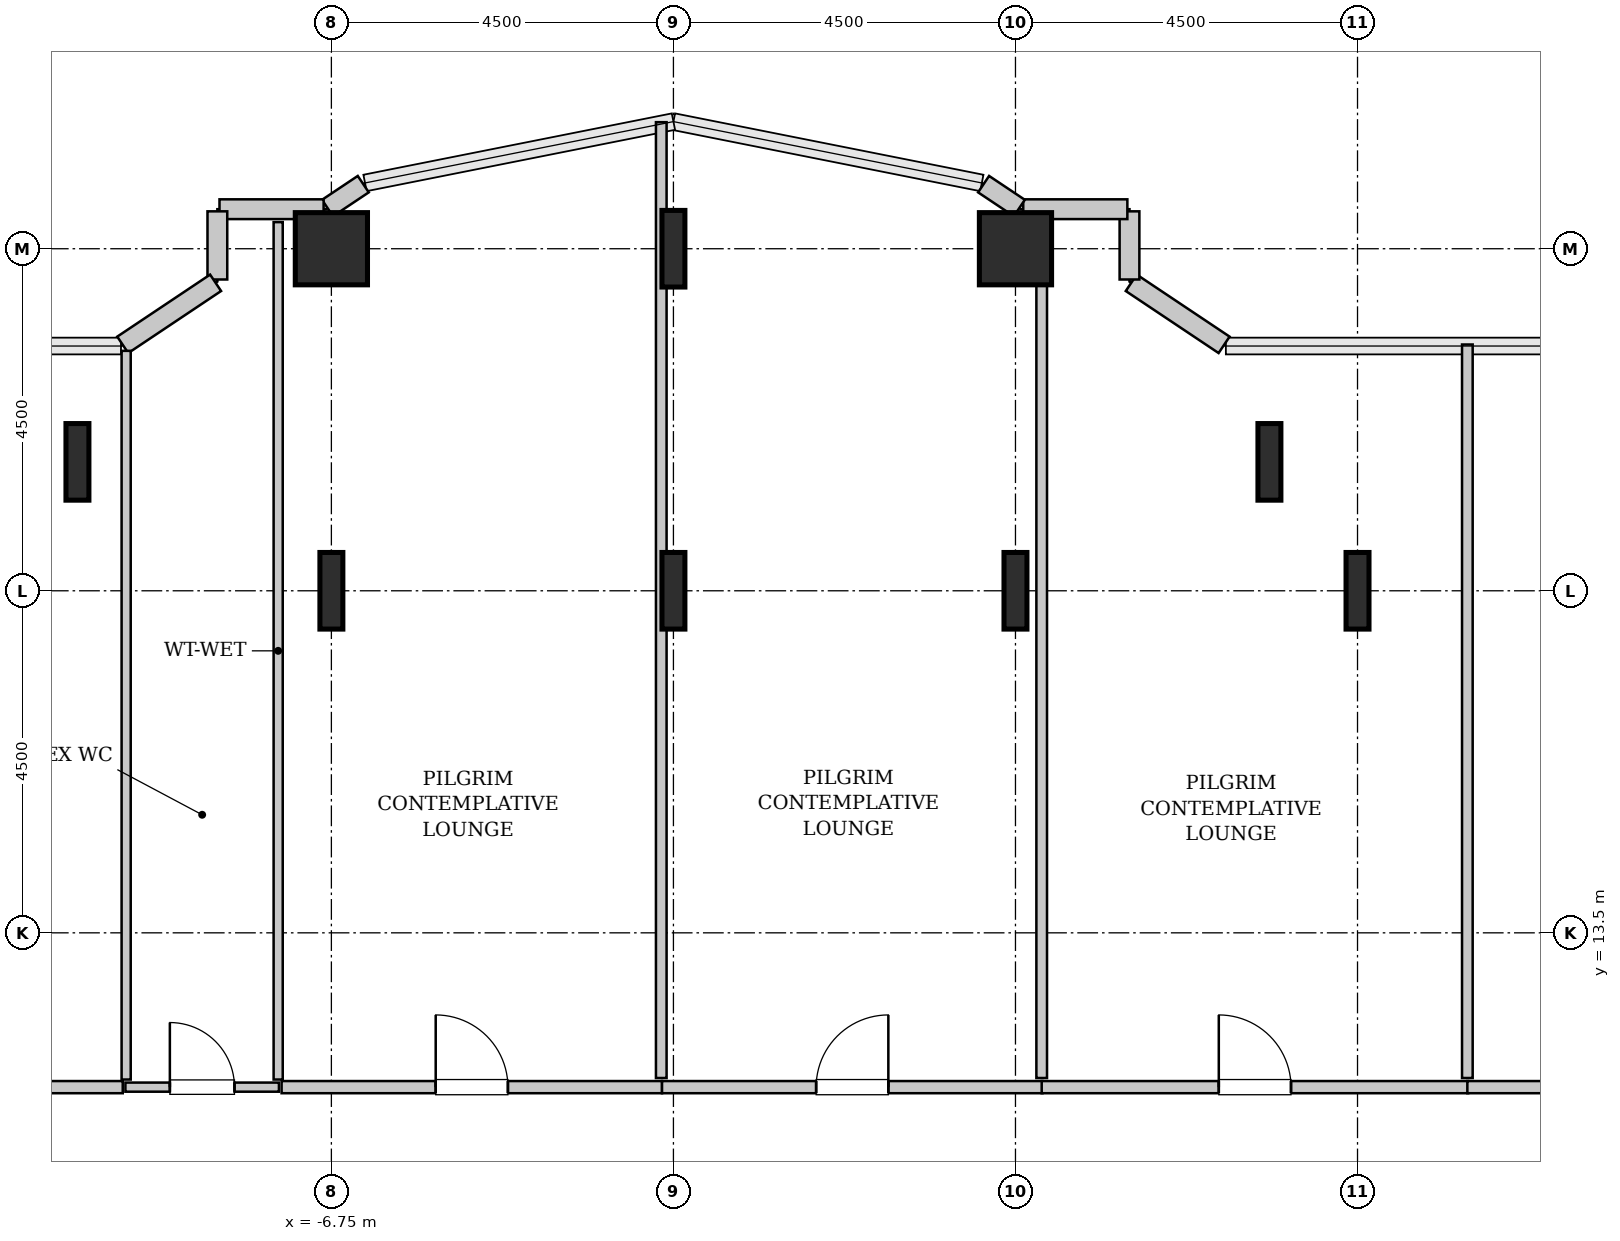
"""IFC4 building model, lengths in metres.
Left out: names, types, materials, properties, quantities, classifications, styles, units other than length and angle.
Written with IfcOpenShell. Run it as: python <this file> out.ifc"""

import sys

from ifc_helpers import new_model, si_unit, direction, frame, frame_2d, origin, origin_2d, place, context, subcontext, project, spatial, rectangle, hollow_rectangle, i_section, extrude, source, transform, mapped, element, fill, save


model = new_model("IFC4")
c1 = context("Model", 3, precision=1e-05, world=origin(), true_north=direction((0.0, 1.0)))
c2 = subcontext(c1, "Body", "Model", "MODEL_VIEW")
j1 = project(units=[si_unit("LENGTHUNIT", "METRE"), si_unit("PLANEANGLEUNIT", "RADIAN")], contexts=[c1])
p1 = place(None, origin())
s1 = spatial("IfcSite", under=j1, at=p1, CompositionType="ELEMENT")
p2 = place(p1, origin())
s2 = spatial("IfcBuilding", under=s1, at=p2, CompositionType="ELEMENT")
p3 = place(p2, frame((0.0, 0.0, 98.4)))
s3 = spatial("IfcBuildingStorey", under=s2, at=p3, CompositionType="ELEMENT", Elevation=98.4)
m1 = source(origin(), c2, "Body", "SweptSolid", [
    extrude(i_section(OverallWidth=0.302, OverallDepth=1.008, WebThickness=0.021, FlangeThickness=0.04, FilletRadius=0.03, at=origin_2d()), origin(), (0.0, 0.0, 1.0), 3.8),
])
for number, where, z_axis, x_axis in (
    (1, (-10.091, 19.696, 0.0), (0.0, 0.0, 1.0), (1.0, 0.0, 0.0)),
    (2, (-6.75, 18.0, 0.0), (0.0, 0.0, 1.0), (1.0, 0.0, 0.0)),
):
    element("IfcColumn", number, at=place(p3, frame(where, z_axis=z_axis, x_axis=x_axis)), inside=s3, PredefinedType="COLUMN", context=c2, shape_type="MappedRepresentation", body=[
        mapped(m1, transform((0.0, 0.0, 0.0), x_axis=(1.0, 0.0, 0.0), y_axis=(0.0, 1.0, 0.0), z_axis=(0.0, 0.0, 1.0), scale=1.0)),
    ])
m2 = source(origin(), c2, "Body", "SweptSolid", [
    extrude(hollow_rectangle(XDim=0.95, YDim=0.95, WallThickness=0.045, InnerFilletRadius=0.045, OuterFilletRadius=0.09, at=origin_2d()), origin(), (0.0, 0.0, 1.0), 3.8),
])
p4 = place(p3, frame((-6.75, 22.5, 0.0), z_axis=(0.0, 0.0, 1.0), x_axis=(1.0, 0.0, 0.0)))
e3 = element("IfcColumn", 3, at=p4, inside=s3, PredefinedType="COLUMN", context=c2, shape_type="MappedRepresentation", body=[
    mapped(m2, transform((0.0, 0.0, 0.0), x_axis=(1.0, 0.0, 0.0), y_axis=(0.0, 1.0, 0.0), z_axis=(0.0, 0.0, 1.0), scale=1.0)),
])
for number, where, z_axis, x_axis in (
    (4, (-2.25, 18.0, 0.0), (0.0, 0.0, 1.0), (1.0, 0.0, 0.0)),
    (5, (-2.25, 22.5, 0.0), (0.0, 0.0, 1.0), (1.0, 0.0, 0.0)),
    (6, (2.25, 18.0, 0.0), (0.0, 0.0, 1.0), (1.0, 0.0, 0.0)),
):
    element("IfcColumn", number, at=place(p3, frame(where, z_axis=z_axis, x_axis=x_axis)), inside=s3, PredefinedType="COLUMN", context=c2, shape_type="MappedRepresentation", body=[
        mapped(m1, transform((0.0, 0.0, 0.0), x_axis=(1.0, 0.0, 0.0), y_axis=(0.0, 1.0, 0.0), z_axis=(0.0, 0.0, 1.0), scale=1.0)),
    ])
p5 = place(p3, frame((2.25, 22.5, 0.0), z_axis=(0.0, 0.0, 1.0), x_axis=(1.0, 0.0, 0.0)))
e7 = element("IfcColumn", 7, at=p5, inside=s3, PredefinedType="COLUMN", context=c2, shape_type="MappedRepresentation", body=[
    mapped(m2, transform((0.0, 0.0, 0.0), x_axis=(1.0, 0.0, 0.0), y_axis=(0.0, 1.0, 0.0), z_axis=(0.0, 0.0, 1.0), scale=1.0)),
])
for number, where, z_axis, x_axis in (
    (8, (5.591, 19.696, 0.0), (0.0, 0.0, 1.0), (1.0, 0.0, 0.0)),
    (9, (6.75, 18.0, 0.0), (0.0, 0.0, 1.0), (1.0, 0.0, 0.0)),
):
    element("IfcColumn", number, at=place(p3, frame(where, z_axis=z_axis, x_axis=x_axis)), inside=s3, PredefinedType="COLUMN", context=c2, shape_type="MappedRepresentation", body=[
        mapped(m1, transform((0.0, 0.0, 0.0), x_axis=(1.0, 0.0, 0.0), y_axis=(0.0, 1.0, 0.0), z_axis=(0.0, 0.0, 1.0), scale=1.0)),
    ])
m3 = source(origin(), c2, "Body", "SweptSolid", [
    extrude(rectangle(XDim=1.469, YDim=0.26, at=frame_2d((0.734, 0.0))), origin(), (0.0, 0.0, 1.0), 3.55),
])
p6 = place(p3, frame((4.995, 21.236, 0.0), z_axis=(0.0, 0.0, 1.0), x_axis=(-0.831461760506, 0.555581983884, 0.0)))
e10 = element("IfcWall", 10, at=p6, inside=s3, PredefinedType="SOLIDWALL", context=c2, shape_type="MappedRepresentation", body=[
    mapped(m3, transform((0.0, 0.0, 0.0), x_axis=(1.0, 0.0, 0.0), y_axis=(0.0, 1.0, 0.0), z_axis=(0.0, 0.0, 1.0), scale=1.0)),
])
m4 = source(origin(), c2, "Body", "SweptSolid", [
    extrude(rectangle(XDim=0.897, YDim=0.26, at=frame_2d((0.448, 0.0))), origin(), (0.0, 0.0, 1.0), 3.55),
])
p7 = place(p3, frame((3.75, 22.095, 0.0), z_axis=(0.0, 0.0, 1.0), x_axis=(0.0, 1.0, 0.0)))
e11 = element("IfcWall", 11, at=p7, inside=s3, PredefinedType="SOLIDWALL", context=c2, shape_type="MappedRepresentation", body=[
    mapped(m4, transform((0.0, 0.0, 0.0), x_axis=(1.0, 0.0, 0.0), y_axis=(0.0, 1.0, 0.0), z_axis=(0.0, 0.0, 1.0), scale=1.0)),
])
m5 = source(origin(), c2, "Body", "SweptSolid", [
    extrude(rectangle(XDim=1.37, YDim=0.26, at=frame_2d((0.685, 0.0))), origin(), (0.0, 0.0, 1.0), 3.55),
])
p8 = place(p3, frame((3.722, 23.02, 0.0), z_axis=(0.0, 0.0, 1.0), x_axis=(-1.0, 0.0, 0.0)))
e12 = element("IfcWall", 12, at=p8, inside=s3, PredefinedType="SOLIDWALL", context=c2, shape_type="MappedRepresentation", body=[
    mapped(m5, transform((0.0, 0.0, 0.0), x_axis=(1.0, 0.0, 0.0), y_axis=(0.0, 1.0, 0.0), z_axis=(0.0, 0.0, 1.0), scale=1.0)),
])
m6 = source(origin(), c2, "Body", "SweptSolid", [
    extrude(rectangle(XDim=0.565, YDim=0.26, at=frame_2d((0.283, 0.0))), origin(), (0.0, 0.0, 1.0), 3.55),
])
for number, where, z_axis, x_axis in (
    (13, (2.301, 23.036, 0.0), (0.0, 0.0, 1.0), (-0.832, 0.555, 0.0)),
    (14, (-6.331, 23.35, 0.0), (0.0, 0.0, 1.0), (-0.832, -0.555, 0.0)),
):
    element("IfcWall", number, at=place(p3, frame(where, z_axis=z_axis, x_axis=x_axis)), inside=s3, PredefinedType="SOLIDWALL", context=c2, shape_type="MappedRepresentation", body=[
        mapped(m6, transform((0.0, 0.0, 0.0), x_axis=(1.0, 0.0, 0.0), y_axis=(0.0, 1.0, 0.0), z_axis=(0.0, 0.0, 1.0), scale=1.0)),
    ])
p9 = place(p3, frame((-6.852, 23.02, 0.0), z_axis=(0.0, 0.0, 1.0), x_axis=(-1.0, 0.0, 0.0)))
e15 = element("IfcWall", 15, at=p9, inside=s3, PredefinedType="SOLIDWALL", context=c2, shape_type="MappedRepresentation", body=[
    mapped(m5, transform((0.0, 0.0, 0.0), x_axis=(1.0, 0.0, 0.0), y_axis=(0.0, 1.0, 0.0), z_axis=(0.0, 0.0, 1.0), scale=1.0)),
])
p10 = place(p3, frame((-8.25, 22.992, 0.0), z_axis=(0.0, 0.0, 1.0), x_axis=(0.0, -1.0, 0.0)))
e16 = element("IfcWall", 16, at=p10, inside=s3, PredefinedType="SOLIDWALL", context=c2, shape_type="MappedRepresentation", body=[
    mapped(m4, transform((0.0, 0.0, 0.0), x_axis=(1.0, 0.0, 0.0), y_axis=(0.0, 1.0, 0.0), z_axis=(0.0, 0.0, 1.0), scale=1.0)),
])
p11 = place(p3, frame((-8.273, 22.052, 0.0), z_axis=(0.0, 0.0, 1.0), x_axis=(-0.831461760506, -0.555581983884, 0.0)))
e17 = element("IfcWall", 17, at=p11, inside=s3, PredefinedType="SOLIDWALL", context=c2, shape_type="MappedRepresentation", body=[
    mapped(m3, transform((0.0, 0.0, 0.0), x_axis=(1.0, 0.0, 0.0), y_axis=(0.0, 1.0, 0.0), z_axis=(0.0, 0.0, 1.0), scale=1.0)),
])
m7 = source(origin(), c2, "Body", "SweptSolid", [
    extrude(rectangle(XDim=2.02, YDim=0.12, at=frame_2d((1.01, 0.0))), origin(), (0.0, 0.0, 1.0), 3.535),
])
p12 = place(p3, frame((-9.46, 11.47, 0.0), z_axis=(0.0, 0.0, 1.0), x_axis=(1.0, 0.0, 0.0)))
e18 = element("IfcWall", 18, at=p12, inside=s3, PredefinedType="PLUMBINGWALL", context=c2, shape_type="MappedRepresentation", body=[
    mapped(m7, transform((0.0, 0.0, 0.0), x_axis=(1.0, 0.0, 0.0), y_axis=(0.0, 1.0, 0.0), z_axis=(0.0, 0.0, 1.0), scale=1.0)),
])
p13 = place(p12, frame((0.585, 0.0, 0.0)))
e19 = element("IfcOpeningElement", 19, at=p13, cuts=e18, PredefinedType="OPENING", context=c2, shape_type="SweptSolid", body=[
    extrude(rectangle(XDim=0.85, YDim=2.1, at=frame_2d((0.425, 1.05))), frame((0.0, 0.07, 0.0), z_axis=(0.0, -1.0, 0.0), x_axis=(1.0, 0.0, 0.0)), (0.0, 0.0, 1.0), 0.14),
])
m8 = source(origin(), c2, "Body", "SweptSolid", [
    extrude(rectangle(XDim=11.28, YDim=0.12, at=frame_2d((5.64, 0.0))), origin(), (0.0, 0.0, 1.0), 3.535),
])
p14 = place(p3, frame((-7.45, 11.57, 0.0), z_axis=(0.0, 0.0, 1.0), x_axis=(0.0, 1.0, 0.0)))
e20 = element("IfcWall", 20, at=p14, inside=s3, PredefinedType="PLUMBINGWALL", context=c2, shape_type="MappedRepresentation", body=[
    mapped(m8, transform((0.0, 0.0, 0.0), x_axis=(1.0, 0.0, 0.0), y_axis=(0.0, 1.0, 0.0), z_axis=(0.0, 0.0, 1.0), scale=1.0)),
])
m9 = source(origin(), c2, "Body", "SweptSolid", [
    extrude(rectangle(XDim=9.587, YDim=0.12, at=frame_2d((4.793, 0.0))), origin(), (0.0, 0.0, 1.0), 3.535),
])
p15 = place(p3, frame((-9.45, 11.57, 0.0), z_axis=(0.0, 0.0, 1.0), x_axis=(0.0, 1.0, 0.0)))
e21 = element("IfcWall", 21, at=p15, inside=s3, PredefinedType="PLUMBINGWALL", context=c2, shape_type="MappedRepresentation", body=[
    mapped(m9, transform((0.0, 0.0, 0.0), x_axis=(1.0, 0.0, 0.0), y_axis=(0.0, 1.0, 0.0), z_axis=(0.0, 0.0, 1.0), scale=1.0)),
])
m10 = source(origin(), c2, "Body", "SweptSolid", [
    extrude(rectangle(XDim=4.125, YDim=0.16, at=frame_2d((2.062, 0.0))), origin(), (0.0, 0.0, 1.0), 3.535),
])
p16 = place(p3, frame((-13.62, 11.47, 0.0), z_axis=(0.0, 0.0, 1.0), x_axis=(1.0, 0.0, 0.0)))
e22 = element("IfcWall", 22, at=p16, inside=s3, PredefinedType="PARTITIONING", context=c2, shape_type="MappedRepresentation", body=[
    mapped(m10, transform((0.0, 0.0, 0.0), x_axis=(1.0, 0.0, 0.0), y_axis=(0.0, 1.0, 0.0), z_axis=(0.0, 0.0, 1.0), scale=1.0)),
])
p17 = place(p16, frame((1.587, 0.0, 0.0)))
e23 = element("IfcOpeningElement", 23, at=p17, cuts=e22, PredefinedType="OPENING", context=c2, shape_type="SweptSolid", body=[
    extrude(rectangle(XDim=0.95, YDim=2.1, at=frame_2d((0.475, 1.05))), frame((0.0, 0.09, 0.0), z_axis=(0.0, -1.0, 0.0), x_axis=(1.0, 0.0, 0.0)), (0.0, 0.0, 1.0), 0.18),
])
m11 = source(origin(), c2, "Body", "SweptSolid", [
    extrude(rectangle(XDim=5.005, YDim=0.16, at=frame_2d((2.502, 0.0))), origin(), (0.0, 0.0, 1.0), 3.535),
])
p18 = place(p3, frame((-7.405, 11.47, 0.0), z_axis=(0.0, 0.0, 1.0), x_axis=(1.0, 0.0, 0.0)))
e24 = element("IfcWall", 24, at=p18, inside=s3, PredefinedType="PARTITIONING", context=c2, shape_type="MappedRepresentation", body=[
    mapped(m11, transform((0.0, 0.0, 0.0), x_axis=(1.0, 0.0, 0.0), y_axis=(0.0, 1.0, 0.0), z_axis=(0.0, 0.0, 1.0), scale=1.0)),
])
p19 = place(p18, frame((2.028, 0.0, 0.0)))
e25 = element("IfcOpeningElement", 25, at=p19, cuts=e24, PredefinedType="OPENING", context=c2, shape_type="SweptSolid", body=[
    extrude(rectangle(XDim=0.95, YDim=2.1, at=frame_2d((0.475, 1.05))), frame((0.0, 0.09, 0.0), z_axis=(0.0, -1.0, 0.0), x_axis=(1.0, 0.0, 0.0)), (0.0, 0.0, 1.0), 0.18),
])
m12 = source(origin(), c2, "Body", "SweptSolid", [
    extrude(rectangle(XDim=12.575, YDim=0.14, at=frame_2d((6.287, 0.0))), origin(), (0.0, 0.0, 1.0), 2.825),
])
p20 = place(p3, frame((-2.41, 11.59, 0.0), z_axis=(0.0, 0.0, 1.0), x_axis=(0.0, 1.0, 0.0)))
e26 = element("IfcWall", 26, at=p20, inside=s3, PredefinedType="PARTITIONING", context=c2, shape_type="MappedRepresentation", body=[
    mapped(m12, transform((0.0, 0.0, 0.0), x_axis=(1.0, 0.0, 0.0), y_axis=(0.0, 1.0, 0.0), z_axis=(0.0, 0.0, 1.0), scale=1.0)),
])
m13 = source(origin(), c2, "Body", "SweptSolid", [
    extrude(rectangle(XDim=5.005, YDim=0.16, at=frame_2d((2.502, 0.0))), origin(), (0.0, 0.0, 1.0), 3.535),
])
p21 = place(p3, frame((-2.4, 11.47, 0.0), z_axis=(0.0, 0.0, 1.0), x_axis=(1.0, 0.0, 0.0)))
e27 = element("IfcWall", 27, at=p21, inside=s3, PredefinedType="PARTITIONING", context=c2, shape_type="MappedRepresentation", body=[
    mapped(m13, transform((0.0, 0.0, 0.0), x_axis=(1.0, 0.0, 0.0), y_axis=(0.0, 1.0, 0.0), z_axis=(0.0, 0.0, 1.0), scale=1.0)),
])
p22 = place(p21, frame((2.028, 0.0, 0.0)))
e28 = element("IfcOpeningElement", 28, at=p22, cuts=e27, PredefinedType="OPENING", context=c2, shape_type="SweptSolid", body=[
    extrude(rectangle(XDim=0.95, YDim=2.1, at=frame_2d((0.475, 1.05))), frame((0.0, 0.09, 0.0), z_axis=(0.0, -1.0, 0.0), x_axis=(1.0, 0.0, 0.0)), (0.0, 0.0, 1.0), 0.18),
])
m14 = source(origin(), c2, "Body", "SweptSolid", [
    extrude(rectangle(XDim=11.26, YDim=0.14, at=frame_2d((5.63, 0.0))), origin(), (0.0, 0.0, 1.0), 2.825),
])
p23 = place(p3, frame((2.595, 11.59, 0.0), z_axis=(0.0, 0.0, 1.0), x_axis=(0.0, 1.0, 0.0)))
e29 = element("IfcWall", 29, at=p23, inside=s3, PredefinedType="PARTITIONING", context=c2, shape_type="MappedRepresentation", body=[
    mapped(m14, transform((0.0, 0.0, 0.0), x_axis=(1.0, 0.0, 0.0), y_axis=(0.0, 1.0, 0.0), z_axis=(0.0, 0.0, 1.0), scale=1.0)),
])
m15 = source(origin(), c2, "Body", "SweptSolid", [
    extrude(rectangle(XDim=5.61, YDim=0.16, at=frame_2d((2.805, 0.0))), origin(), (0.0, 0.0, 1.0), 3.535),
])
p24 = place(p3, frame((2.595, 11.47, 0.0), z_axis=(0.0, 0.0, 1.0), x_axis=(1.0, 0.0, 0.0)))
e30 = element("IfcWall", 30, at=p24, inside=s3, PredefinedType="PARTITIONING", context=c2, shape_type="MappedRepresentation", body=[
    mapped(m15, transform((0.0, 0.0, 0.0), x_axis=(1.0, 0.0, 0.0), y_axis=(0.0, 1.0, 0.0), z_axis=(0.0, 0.0, 1.0), scale=1.0)),
])
p25 = place(p24, frame((2.33, 0.0, 0.0)))
e31 = element("IfcOpeningElement", 31, at=p25, cuts=e30, PredefinedType="OPENING", context=c2, shape_type="SweptSolid", body=[
    extrude(rectangle(XDim=0.95, YDim=2.1, at=frame_2d((0.475, 1.05))), frame((0.0, 0.09, 0.0), z_axis=(0.0, -1.0, 0.0), x_axis=(1.0, 0.0, 0.0)), (0.0, 0.0, 1.0), 0.18),
])
m16 = source(origin(), c2, "Body", "SweptSolid", [
    extrude(rectangle(XDim=9.65, YDim=0.14, at=frame_2d((4.825, 0.0))), origin(), (0.0, 0.0, 1.0), 3.535),
])
p26 = place(p3, frame((8.195, 11.59, 0.0), z_axis=(0.0, 0.0, 1.0), x_axis=(0.0, 1.0, 0.0)))
e32 = element("IfcWall", 32, at=p26, inside=s3, PredefinedType="PARTITIONING", context=c2, shape_type="MappedRepresentation", body=[
    mapped(m16, transform((0.0, 0.0, 0.0), x_axis=(1.0, 0.0, 0.0), y_axis=(0.0, 1.0, 0.0), z_axis=(0.0, 0.0, 1.0), scale=1.0)),
])
m17 = source(origin(), c2, "Body", "SweptSolid", [
    extrude(rectangle(XDim=5.425, YDim=0.16, at=frame_2d((2.712, 0.0))), origin(), (0.0, 0.0, 1.0), 3.535),
])
p27 = place(p3, frame((8.195, 11.47, 0.0), z_axis=(0.0, 0.0, 1.0), x_axis=(1.0, 0.0, 0.0)))
e33 = element("IfcWall", 33, at=p27, inside=s3, PredefinedType="PARTITIONING", context=c2, shape_type="MappedRepresentation", body=[
    mapped(m17, transform((0.0, 0.0, 0.0), x_axis=(1.0, 0.0, 0.0), y_axis=(0.0, 1.0, 0.0), z_axis=(0.0, 0.0, 1.0), scale=1.0)),
])
p28 = place(p27, frame((2.238, 0.0, 0.0)))
e34 = element("IfcOpeningElement", 34, at=p28, cuts=e33, PredefinedType="OPENING", context=c2, shape_type="SweptSolid", body=[
    extrude(rectangle(XDim=0.95, YDim=2.1, at=frame_2d((0.475, 1.05))), frame((0.0, 0.09, 0.0), z_axis=(0.0, -1.0, 0.0), x_axis=(1.0, 0.0, 0.0)), (0.0, 0.0, 1.0), 0.18),
])
m18 = source(origin(), c2, "Body", "SweptSolid", [
    extrude(rectangle(XDim=0.85, YDim=2.1, at=frame_2d((0.425, 1.05))), frame((0.0, 0.025, 0.0), z_axis=(0.0, -1.0, 0.0), x_axis=(1.0, 0.0, 0.0)), (0.0, 0.0, 1.0), 0.05),
])
p29 = place(p13, origin())
e35 = element("IfcDoor", 35, at=p29, inside=s3, OperationType="SINGLE_SWING_LEFT", PredefinedType="DOOR", context=c2, shape_type="MappedRepresentation", body=[
    mapped(m18, transform((0.0, 0.0, 0.0), x_axis=(1.0, 0.0, 0.0), y_axis=(0.0, 1.0, 0.0), z_axis=(0.0, 0.0, 1.0), scale=1.0)),
])
fill(e19, e35)
m19 = source(origin(), c2, "Body", "SweptSolid", [
    extrude(rectangle(XDim=0.95, YDim=2.1, at=frame_2d((0.475, 1.05))), frame((0.0, 0.025, 0.0), z_axis=(0.0, -1.0, 0.0), x_axis=(1.0, 0.0, 0.0)), (0.0, 0.0, 1.0), 0.05),
])
p30 = place(p19, origin())
e36 = element("IfcDoor", 36, at=p30, inside=s3, OperationType="SINGLE_SWING_LEFT", PredefinedType="DOOR", context=c2, shape_type="MappedRepresentation", body=[
    mapped(m19, transform((0.0, 0.0, 0.0), x_axis=(1.0, 0.0, 0.0), y_axis=(0.0, 1.0, 0.0), z_axis=(0.0, 0.0, 1.0), scale=1.0)),
])
fill(e25, e36)
p31 = place(p22, origin())
e37 = element("IfcDoor", 37, at=p31, inside=s3, OperationType="SINGLE_SWING_RIGHT", PredefinedType="DOOR", context=c2, shape_type="MappedRepresentation", body=[
    mapped(m19, transform((0.0, 0.0, 0.0), x_axis=(1.0, 0.0, 0.0), y_axis=(0.0, 1.0, 0.0), z_axis=(0.0, 0.0, 1.0), scale=1.0)),
])
fill(e28, e37)
p32 = place(p25, origin())
e38 = element("IfcDoor", 38, at=p32, inside=s3, OperationType="SINGLE_SWING_LEFT", PredefinedType="DOOR", context=c2, shape_type="MappedRepresentation", body=[
    mapped(m19, transform((0.0, 0.0, 0.0), x_axis=(1.0, 0.0, 0.0), y_axis=(0.0, 1.0, 0.0), z_axis=(0.0, 0.0, 1.0), scale=1.0)),
])
fill(e31, e38)
save(model, sys.argv[1])
